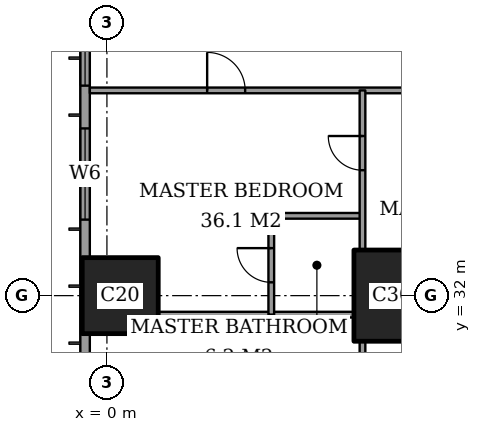
"""IFC4 building model, lengths in metres.
Left out: names, types, materials, properties, quantities, classifications, styles, units other than length and angle.
Written with IfcOpenShell. Run it as: python <this file> out.ifc"""

import sys

from ifc_helpers import new_model, si_unit, direction, frame, frame_2d, origin, origin_2d, place, context, subcontext, project, spatial, rectangle, extrude, element, fill, save


model = new_model("IFC4")
c1 = context("Model", 3, precision=1e-05, world=origin(), true_north=direction((0.0, 1.0)))
c2 = subcontext(c1, "Body", "Model", "MODEL_VIEW")
j1 = project(units=[si_unit("LENGTHUNIT", "METRE"), si_unit("PLANEANGLEUNIT", "RADIAN")], contexts=[c1])
p1 = place(None, origin())
s1 = spatial("IfcSite", under=j1, at=p1, CompositionType="ELEMENT")
p2 = place(p1, origin())
s2 = spatial("IfcBuilding", under=s1, at=p2, CompositionType="ELEMENT")
p3 = place(p2, frame((0.0, 0.0, 65.6)))
s3 = spatial("IfcBuildingStorey", under=s2, at=p3, CompositionType="ELEMENT", Elevation=65.6)
p4 = place(p3, frame((0.35, 32.0, 0.0), z_axis=(0.0, 0.0, 1.0), x_axis=(1.0, 0.0, 0.0)))
e1 = element("IfcColumn", 1, at=p4, inside=s3, PredefinedType="COLUMN", context=c2, shape_type="SweptSolid", body=[
    extrude(rectangle(XDim=2.0, YDim=2.0, at=origin_2d()), origin(), (0.0, 0.0, 1.0), 3.6),
])
p5 = place(p3, frame((8.0, 32.0, 0.0), z_axis=(0.0, 0.0, 1.0), x_axis=(1.0, 0.0, 0.0)))
e2 = element("IfcColumn", 2, at=p5, inside=s3, PredefinedType="COLUMN", context=c2, shape_type="SweptSolid", body=[
    extrude(rectangle(XDim=3.0, YDim=2.4, at=origin_2d()), origin(), (0.0, 0.0, 1.0), 3.6),
])
p6 = place(p3, frame((-0.575, 44.825, 0.0), z_axis=(0.0, 0.0, 1.0), x_axis=(0.0, -1.0, 0.0)))
e3 = element("IfcWall", 3, at=p6, inside=s3, PredefinedType="SOLIDWALL", context=c2, shape_type="SweptSolid", body=[
    extrude(rectangle(XDim=41.65, YDim=0.25, at=frame_2d((20.825, 0.0))), origin(), (0.0, 0.0, 1.0), 3.6),
])
p7 = place(p6, frame((0.775, 0.0, 0.6)))
e4 = element("IfcOpeningElement", 4, at=p7, cuts=e3, PredefinedType="OPENING", context=c2, shape_type="SweptSolid", body=[
    extrude(rectangle(XDim=2.4, YDim=2.0, at=frame_2d((1.2, 1.0))), frame((0.0, 0.135, 0.0), z_axis=(0.0, -1.0, 0.0), x_axis=(1.0, 0.0, 0.0)), (0.0, 0.0, 1.0), 0.27),
])
p8 = place(p6, frame((6.1, 0.0, 0.6)))
e5 = element("IfcOpeningElement", 5, at=p8, cuts=e3, PredefinedType="OPENING", context=c2, shape_type="SweptSolid", body=[
    extrude(rectangle(XDim=1.2, YDim=2.0, at=frame_2d((0.6, 1.0))), frame((0.0, 0.135, 0.0), z_axis=(0.0, -1.0, 0.0), x_axis=(1.0, 0.0, 0.0)), (0.0, 0.0, 1.0), 0.27),
])
p9 = place(p6, frame((8.425, 0.0, 0.6)))
e6 = element("IfcOpeningElement", 6, at=p9, cuts=e3, PredefinedType="OPENING", context=c2, shape_type="SweptSolid", body=[
    extrude(rectangle(XDim=2.4, YDim=2.0, at=frame_2d((1.2, 1.0))), frame((0.0, 0.135, 0.0), z_axis=(0.0, -1.0, 0.0), x_axis=(1.0, 0.0, 0.0)), (0.0, 0.0, 1.0), 0.27),
])
p10 = place(p6, frame((15.625, 0.0, 0.6)))
e7 = element("IfcOpeningElement", 7, at=p10, cuts=e3, PredefinedType="OPENING", context=c2, shape_type="SweptSolid", body=[
    extrude(rectangle(XDim=2.4, YDim=2.0, at=frame_2d((1.2, 1.0))), frame((0.0, 0.135, 0.0), z_axis=(0.0, -1.0, 0.0), x_axis=(1.0, 0.0, 0.0)), (0.0, 0.0, 1.0), 0.27),
])
p11 = place(p6, frame((23.625, 0.0, 0.6)))
e8 = element("IfcOpeningElement", 8, at=p11, cuts=e3, PredefinedType="OPENING", context=c2, shape_type="SweptSolid", body=[
    extrude(rectangle(XDim=2.4, YDim=2.0, at=frame_2d((1.2, 1.0))), frame((0.0, 0.135, 0.0), z_axis=(0.0, -1.0, 0.0), x_axis=(1.0, 0.0, 0.0)), (0.0, 0.0, 1.0), 0.27),
])
p12 = place(p6, frame((30.825, 0.0, 0.6)))
e9 = element("IfcOpeningElement", 9, at=p12, cuts=e3, PredefinedType="OPENING", context=c2, shape_type="SweptSolid", body=[
    extrude(rectangle(XDim=2.4, YDim=2.0, at=frame_2d((1.2, 1.0))), frame((0.0, 0.135, 0.0), z_axis=(0.0, -1.0, 0.0), x_axis=(1.0, 0.0, 0.0)), (0.0, 0.0, 1.0), 0.27),
])
p13 = place(p6, frame((34.5, 0.0, 0.6)))
e10 = element("IfcOpeningElement", 10, at=p13, cuts=e3, PredefinedType="OPENING", context=c2, shape_type="SweptSolid", body=[
    extrude(rectangle(XDim=1.2, YDim=2.0, at=frame_2d((0.6, 1.0))), frame((0.0, 0.135, 0.0), z_axis=(0.0, -1.0, 0.0), x_axis=(1.0, 0.0, 0.0)), (0.0, 0.0, 1.0), 0.27),
])
p14 = place(p6, frame((38.475, 0.0, 0.6)))
e11 = element("IfcOpeningElement", 11, at=p14, cuts=e3, PredefinedType="OPENING", context=c2, shape_type="SweptSolid", body=[
    extrude(rectangle(XDim=2.4, YDim=2.0, at=frame_2d((1.2, 1.0))), frame((0.0, 0.135, 0.0), z_axis=(0.0, -1.0, 0.0), x_axis=(1.0, 0.0, 0.0)), (0.0, 0.0, 1.0), 0.27),
])
p15 = place(p3, frame((1.35, 31.5, 0.0), z_axis=(0.0, 0.0, 1.0), x_axis=(1.0, 0.0, 0.0)))
e12 = element("IfcWall", 12, at=p15, inside=s3, PredefinedType="PARTITIONING", context=c2, shape_type="SweptSolid", body=[
    extrude(rectangle(XDim=5.15, YDim=0.15, at=frame_2d((2.575, 0.0))), origin(), (0.0, 0.0, 1.0), 3.35),
])
p16 = place(p3, frame((4.325, 34.1, 0.0), z_axis=(0.0, 0.0, 1.0), x_axis=(1.0, 0.0, 0.0)))
e13 = element("IfcWall", 13, at=p16, inside=s3, PredefinedType="PARTITIONING", context=c2, shape_type="SweptSolid", body=[
    extrude(rectangle(XDim=2.4, YDim=0.15, at=frame_2d((1.2, 0.0))), origin(), (0.0, 0.0, 1.0), 3.35),
])
p17 = place(p3, frame((-0.45, 37.4, 0.0), z_axis=(0.0, 0.0, 1.0), x_axis=(1.0, 0.0, 0.0)))
e14 = element("IfcWall", 14, at=p17, inside=s3, PredefinedType="PARTITIONING", context=c2, shape_type="SweptSolid", body=[
    extrude(rectangle(XDim=25.011, YDim=0.15, at=frame_2d((12.505, 0.0))), origin(), (0.0, 0.0, 1.0), 3.35),
])
p18 = place(p17, frame((10.65, 0.0, 0.0)))
e15 = element("IfcOpeningElement", 15, at=p18, cuts=e14, PredefinedType="OPENING", context=c2, shape_type="SweptSolid", body=[
    extrude(rectangle(XDim=1.0, YDim=2.1, at=frame_2d((0.5, 1.05))), frame((0.0, 0.085, 0.0), z_axis=(0.0, -1.0, 0.0), x_axis=(1.0, 0.0, 0.0)), (0.0, 0.0, 1.0), 0.17),
])
p19 = place(p17, frame((3.087, 0.0, 0.0)))
e16 = element("IfcOpeningElement", 16, at=p19, cuts=e14, PredefinedType="OPENING", context=c2, shape_type="SweptSolid", body=[
    extrude(rectangle(XDim=1.0, YDim=2.1, at=frame_2d((0.5, 1.05))), frame((0.0, 0.085, 0.0), z_axis=(0.0, -1.0, 0.0), x_axis=(1.0, 0.0, 0.0)), (0.0, 0.0, 1.0), 0.17),
])
p20 = place(p17, frame((13.45, 0.0, 0.0)))
e17 = element("IfcOpeningElement", 17, at=p20, cuts=e14, PredefinedType="OPENING", context=c2, shape_type="SweptSolid", body=[
    extrude(rectangle(XDim=1.0, YDim=2.1, at=frame_2d((0.5, 1.05))), frame((0.0, 0.085, 0.0), z_axis=(0.0, -1.0, 0.0), x_axis=(1.0, 0.0, 0.0)), (0.0, 0.0, 1.0), 0.17),
])
p21 = place(p17, frame((16.55, 0.0, 0.0)))
e18 = element("IfcOpeningElement", 18, at=p21, cuts=e14, PredefinedType="OPENING", context=c2, shape_type="SweptSolid", body=[
    extrude(rectangle(XDim=1.0, YDim=2.1, at=frame_2d((0.5, 1.05))), frame((0.0, 0.085, 0.0), z_axis=(0.0, -1.0, 0.0), x_axis=(1.0, 0.0, 0.0)), (0.0, 0.0, 1.0), 0.17),
])
p22 = place(p17, frame((21.175, 0.0, 0.0)))
e19 = element("IfcOpeningElement", 19, at=p22, cuts=e14, PredefinedType="OPENING", context=c2, shape_type="SweptSolid", body=[
    extrude(rectangle(XDim=1.0, YDim=2.1, at=frame_2d((0.5, 1.05))), frame((0.0, 0.085, 0.0), z_axis=(0.0, -1.0, 0.0), x_axis=(1.0, 0.0, 0.0)), (0.0, 0.0, 1.0), 0.17),
])
p23 = place(p3, frame((4.325, 31.5, 0.0), z_axis=(0.0, 0.0, 1.0), x_axis=(0.0, 1.0, 0.0)))
e20 = element("IfcWall", 20, at=p23, inside=s3, PredefinedType="PARTITIONING", context=c2, shape_type="SweptSolid", body=[
    extrude(rectangle(XDim=2.6, YDim=0.15, at=frame_2d((1.3, 0.0))), origin(), (0.0, 0.0, 1.0), 3.35),
])
p24 = place(p23, frame((0.85, 0.0, 0.0)))
e21 = element("IfcOpeningElement", 21, at=p24, cuts=e20, PredefinedType="OPENING", context=c2, shape_type="SweptSolid", body=[
    extrude(rectangle(XDim=0.9, YDim=2.1, at=frame_2d((0.45, 1.05))), frame((0.0, 0.085, 0.0), z_axis=(0.0, -1.0, 0.0), x_axis=(1.0, 0.0, 0.0)), (0.0, 0.0, 1.0), 0.17),
])
p25 = place(p3, frame((6.725, 28.35, 0.0), z_axis=(0.0, 0.0, 1.0), x_axis=(0.0, 1.0, 0.0)))
e22 = element("IfcWall", 22, at=p25, inside=s3, PredefinedType="PARTITIONING", context=c2, shape_type="SweptSolid", body=[
    extrude(rectangle(XDim=2.45, YDim=0.15, at=frame_2d((1.225, 0.0))), origin(), (0.0, 0.0, 1.0), 3.35),
])
p26 = place(p25, frame((0.913, 0.0, 0.0)))
e23 = element("IfcOpeningElement", 23, at=p26, cuts=e22, PredefinedType="OPENING", context=c2, shape_type="SweptSolid", body=[
    extrude(rectangle(XDim=1.0, YDim=2.1, at=frame_2d((0.5, 1.05))), frame((0.0, 0.085, 0.0), z_axis=(0.0, -1.0, 0.0), x_axis=(1.0, 0.0, 0.0)), (0.0, 0.0, 1.0), 0.17),
])
p27 = place(p3, frame((6.725, 33.2, 0.0), z_axis=(0.0, 0.0, 1.0), x_axis=(0.0, 1.0, 0.0)))
e24 = element("IfcWall", 24, at=p27, inside=s3, PredefinedType="PARTITIONING", context=c2, shape_type="SweptSolid", body=[
    extrude(rectangle(XDim=4.2, YDim=0.15, at=frame_2d((2.1, 0.0))), origin(), (0.0, 0.0, 1.0), 3.35),
])
p28 = place(p27, frame((2.1, 0.0, 0.0)))
e25 = element("IfcOpeningElement", 25, at=p28, cuts=e24, PredefinedType="OPENING", context=c2, shape_type="SweptSolid", body=[
    extrude(rectangle(XDim=0.9, YDim=2.1, at=frame_2d((0.45, 1.05))), frame((0.0, 0.085, 0.0), z_axis=(0.0, -1.0, 0.0), x_axis=(1.0, 0.0, 0.0)), (0.0, 0.0, 1.0), 0.17),
])
p29 = place(p8, origin())
e26 = element("IfcWindow", 26, at=p29, inside=s3, PartitioningType="SINGLE_PANEL", PredefinedType="WINDOW", context=c2, shape_type="SweptSolid", body=[
    extrude(rectangle(XDim=1.2, YDim=2.0, at=frame_2d((0.6, 1.0))), frame((0.0, 0.03, 0.0), z_axis=(0.0, -1.0, 0.0), x_axis=(1.0, 0.0, 0.0)), (0.0, 0.0, 1.0), 0.06),
])
fill(e5, e26)
p30 = place(p9, origin())
e27 = element("IfcWindow", 27, at=p30, inside=s3, PartitioningType="SINGLE_PANEL", PredefinedType="WINDOW", context=c2, shape_type="SweptSolid", body=[
    extrude(rectangle(XDim=2.4, YDim=2.0, at=frame_2d((1.2, 1.0))), frame((0.0, 0.03, 0.0), z_axis=(0.0, -1.0, 0.0), x_axis=(1.0, 0.0, 0.0)), (0.0, 0.0, 1.0), 0.06),
])
fill(e6, e27)
p31 = place(p24, origin())
e28 = element("IfcDoor", 28, at=p31, inside=s3, OperationType="SINGLE_SWING_LEFT", PredefinedType="DOOR", context=c2, shape_type="SweptSolid", body=[
    extrude(rectangle(XDim=0.9, YDim=2.1, at=frame_2d((0.45, 1.05))), frame((0.0, 0.025, 0.0), z_axis=(0.0, -1.0, 0.0), x_axis=(1.0, 0.0, 0.0)), (0.0, 0.0, 1.0), 0.05),
])
fill(e21, e28)
p32 = place(p19, origin())
e29 = element("IfcDoor", 29, at=p32, inside=s3, OperationType="SINGLE_SWING_RIGHT", PredefinedType="DOOR", context=c2, shape_type="SweptSolid", body=[
    extrude(rectangle(XDim=1.0, YDim=2.1, at=frame_2d((0.5, 1.05))), frame((0.0, 0.025, 0.0), z_axis=(0.0, -1.0, 0.0), x_axis=(1.0, 0.0, 0.0)), (0.0, 0.0, 1.0), 0.05),
])
fill(e16, e29)
p33 = place(p28, origin())
e30 = element("IfcDoor", 30, at=p33, inside=s3, OperationType="SINGLE_SWING_LEFT", PredefinedType="DOOR", context=c2, shape_type="SweptSolid", body=[
    extrude(rectangle(XDim=0.9, YDim=2.1, at=frame_2d((0.45, 1.05))), frame((0.0, 0.025, 0.0), z_axis=(0.0, -1.0, 0.0), x_axis=(1.0, 0.0, 0.0)), (0.0, 0.0, 1.0), 0.05),
])
fill(e25, e30)
save(model, sys.argv[1])
